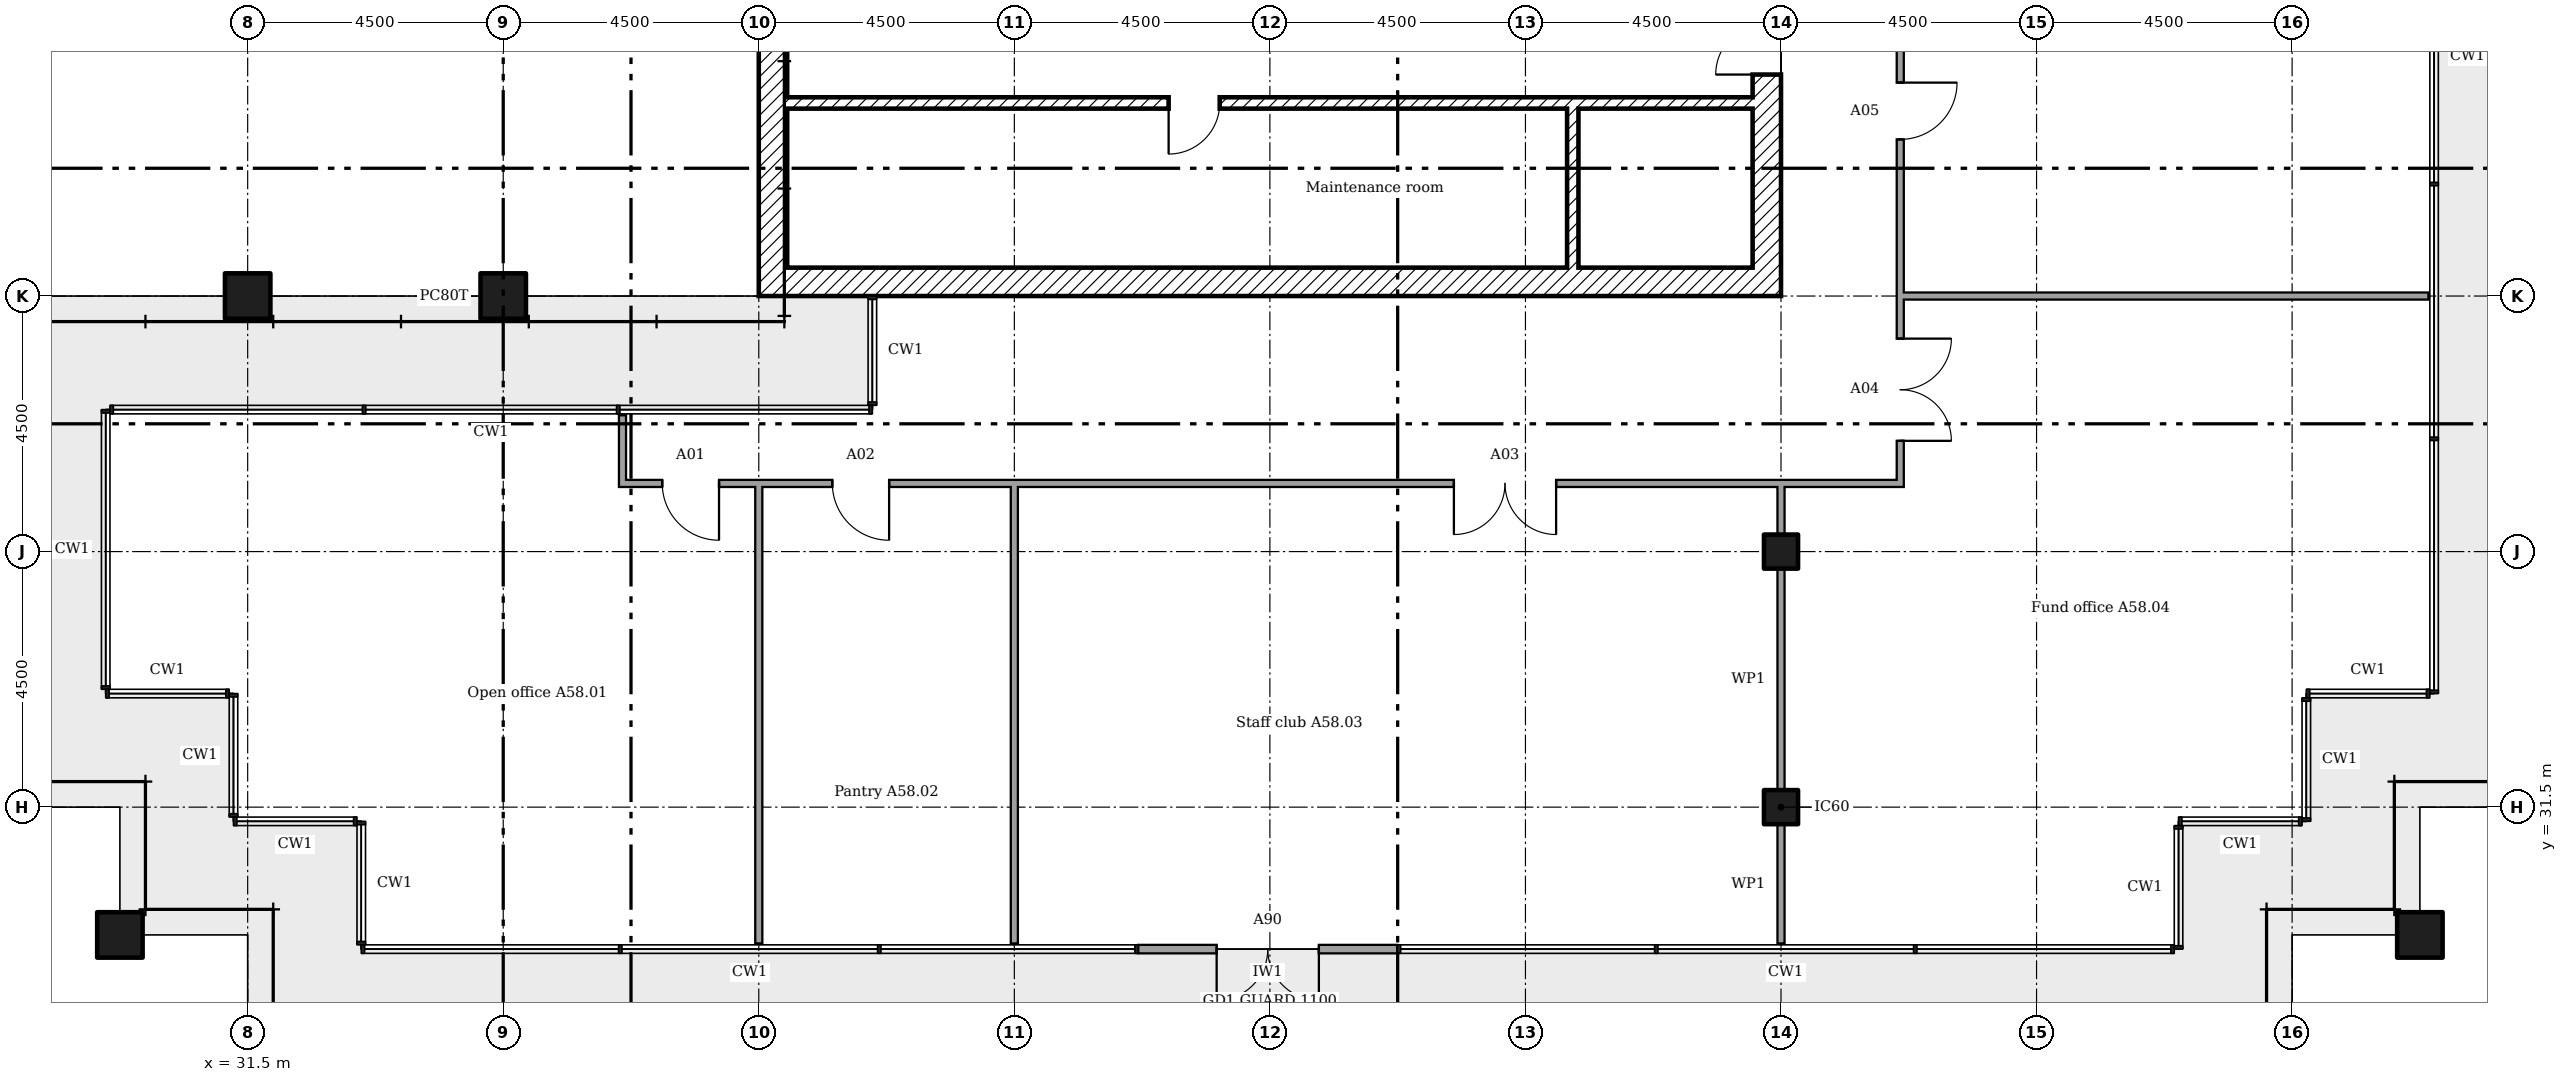
"""IFC4 building model, lengths in metres.
Left out: names, types, materials, properties, quantities, classifications, styles, units other than length and angle.
Written with IfcOpenShell. Run it as: python <this file> out.ifc"""

import sys

from ifc_helpers import new_model, si_unit, direction, frame, frame_2d, origin, origin_2d, place, context, subcontext, project, spatial, rectangle, extrude, element, fill, save


model = new_model("IFC4")
c1 = context("Model", 3, precision=1e-05, world=origin(), true_north=direction((0.0, 1.0)))
c2 = subcontext(c1, "Body", "Model", "MODEL_VIEW")
j1 = project(units=[si_unit("LENGTHUNIT", "METRE"), si_unit("PLANEANGLEUNIT", "RADIAN")], contexts=[c1])
p1 = place(None, origin())
s1 = spatial("IfcSite", under=j1, at=p1, CompositionType="ELEMENT")
p2 = place(p1, origin())
s2 = spatial("IfcBuilding", under=s1, at=p2, CompositionType="ELEMENT")
p3 = place(p2, frame((0.0, 0.0, 228.0)))
s3 = spatial("IfcBuildingStorey", under=s2, at=p3, CompositionType="ELEMENT", Elevation=228.0)
for number, where in (
    (1, (69.75, 29.25, 0.0)),
    (2, (36.0, 40.5, 0.0)),
    (3, (31.5, 40.5, 0.0)),
    (4, (29.25, 29.25, 0.0)),
):
    element("IfcColumn", number, at=place(p3, frame(where)), inside=s3, PredefinedType="COLUMN", context=c2, shape_type="SweptSolid", body=[
        extrude(rectangle(XDim=0.8, YDim=0.8, at=origin_2d()), origin(), (0.0, 0.0, 1.0), 3.6),
    ])
for number, where in (
    (5, (58.5, 31.5, 0.0)),
    (6, (58.5, 36.0, 0.0)),
):
    element("IfcColumn", number, at=place(p3, frame(where)), inside=s3, PredefinedType="COLUMN", context=c2, shape_type="SweptSolid", body=[
        extrude(rectangle(XDim=0.6, YDim=0.6, at=origin_2d()), origin(), (0.0, 0.0, 1.0), 3.6),
    ])
p4 = place(p3, frame((47.182, 29.0, 0.0)))
e7 = element("IfcWall", 7, at=p4, inside=s3, PredefinedType="SOLIDWALL", context=c2, shape_type="SweptSolid", body=[
    extrude(rectangle(XDim=4.561, YDim=0.15, at=frame_2d((2.28, 0.0))), origin(), (0.0, 0.0, 1.0), 3.45),
])
p5 = place(p4, frame((1.38, 0.0, 0.0)))
e8 = element("IfcOpeningElement", 8, at=p5, cuts=e7, PredefinedType="OPENING", context=c2, shape_type="SweptSolid", body=[
    extrude(rectangle(XDim=1.8, YDim=2.4, at=frame_2d((0.9, 1.2))), frame((0.0, 0.085, 0.0), z_axis=(0.0, -1.0, 0.0), x_axis=(1.0, 0.0, 0.0)), (0.0, 0.0, 1.0), 0.17),
])
p6 = place(p3, frame((58.25, 40.5, 0.0), z_axis=(0.0, 0.0, 1.0), x_axis=(0.0, 1.0, 0.0)))
e9 = element("IfcWall", 9, at=p6, inside=s3, PredefinedType="SHEAR", context=c2, shape_type="SweptSolid", body=[
    extrude(rectangle(XDim=18.0, YDim=0.5, at=frame_2d((9.0, 0.0))), origin(), (0.0, 0.0, 1.0), 3.35),
])
p7 = place(p6, frame((13.15, 0.0, 0.0)))
e10 = element("IfcOpeningElement", 10, at=p7, cuts=e9, PredefinedType="OPENING", context=c2, shape_type="SweptSolid", body=[
    extrude(rectangle(XDim=1.2, YDim=2.1, at=frame_2d((0.6, 1.05))), frame((0.0, 0.26, 0.0), z_axis=(0.0, -1.0, 0.0), x_axis=(1.0, 0.0, 0.0)), (0.0, 0.0, 1.0), 0.52),
])
p8 = place(p6, frame((3.9, 0.0, 0.0)))
e11 = element("IfcOpeningElement", 11, at=p8, cuts=e9, PredefinedType="OPENING", context=c2, shape_type="SweptSolid", body=[
    extrude(rectangle(XDim=1.8, YDim=2.1, at=frame_2d((0.9, 1.05))), frame((0.0, 0.26, 0.0), z_axis=(0.0, -1.0, 0.0), x_axis=(1.0, 0.0, 0.0)), (0.0, 0.0, 1.0), 0.52),
])
p9 = place(p6, frame((11.525, 0.0, 0.0)))
e12 = element("IfcOpeningElement", 12, at=p9, cuts=e9, PredefinedType="OPENING", context=c2, shape_type="SweptSolid", body=[
    extrude(rectangle(XDim=1.0, YDim=2.1, at=frame_2d((0.5, 1.05))), frame((0.0, 0.26, 0.0), z_axis=(0.0, -1.0, 0.0), x_axis=(1.0, 0.0, 0.0)), (0.0, 0.0, 1.0), 0.52),
])
p10 = place(p3, frame((40.5, 40.75, 0.0)))
e13 = element("IfcWall", 13, at=p10, inside=s3, PredefinedType="SHEAR", context=c2, shape_type="SweptSolid", body=[
    extrude(rectangle(XDim=17.5, YDim=0.5, at=frame_2d((8.75, 0.0))), origin(), (0.0, 0.0, 1.0), 3.35),
])
p11 = place(p3, frame((40.75, 41.0, 0.0), z_axis=(0.0, 0.0, 1.0), x_axis=(0.0, 1.0, 0.0)))
e14 = element("IfcWall", 14, at=p11, inside=s3, PredefinedType="SHEAR", context=c2, shape_type="SweptSolid", body=[
    extrude(rectangle(XDim=17.0, YDim=0.5, at=frame_2d((8.5, 0.0))), origin(), (0.0, 0.0, 1.0), 3.35),
])
p12 = place(p3, frame((54.833, 41.0, 0.0), z_axis=(0.0, 0.0, 1.0), x_axis=(0.0, 1.0, 0.0)))
e15 = element("IfcWall", 15, at=p12, inside=s3, PredefinedType="SHEAR", context=c2, shape_type="SweptSolid", body=[
    extrude(rectangle(XDim=2.8, YDim=0.2, at=frame_2d((1.4, 0.0))), origin(), (0.0, 0.0, 1.0), 3.35),
])
p13 = place(p3, frame((41.0, 43.9, 0.0)))
e16 = element("IfcWall", 16, at=p13, inside=s3, PredefinedType="SHEAR", context=c2, shape_type="SweptSolid", body=[
    extrude(rectangle(XDim=17.0, YDim=0.2, at=frame_2d((8.5, 0.0))), origin(), (0.0, 0.0, 1.0), 3.35),
])
p14 = place(p13, frame((6.717, 0.0, 0.0)))
e17 = element("IfcOpeningElement", 17, at=p14, cuts=e16, PredefinedType="OPENING", context=c2, shape_type="SweptSolid", body=[
    extrude(rectangle(XDim=0.9, YDim=2.1, at=frame_2d((0.45, 1.05))), frame((0.0, 0.11, 0.0), z_axis=(0.0, -1.0, 0.0), x_axis=(1.0, 0.0, 0.0)), (0.0, 0.0, 1.0), 0.22),
])
p15 = place(p3, frame((38.038, 37.2, 0.0)))
e18 = element("IfcWall", 18, at=p15, inside=s3, PredefinedType="PARTITIONING", context=c2, shape_type="SweptSolid", body=[
    extrude(rectangle(XDim=22.625, YDim=0.125, at=frame_2d((11.312, 0.0))), origin(), (0.0, 0.0, 1.0), 3.45),
])
p16 = place(p15, frame((0.762, 0.0, 0.0)))
e19 = element("IfcOpeningElement", 19, at=p16, cuts=e18, PredefinedType="OPENING", context=c2, shape_type="SweptSolid", body=[
    extrude(rectangle(XDim=1.0, YDim=2.1, at=frame_2d((0.5, 1.05))), frame((0.0, 0.073, 0.0), z_axis=(0.0, -1.0, 0.0), x_axis=(1.0, 0.0, 0.0)), (0.0, 0.0, 1.0), 0.145),
])
p17 = place(p15, frame((3.758, 0.0, 0.0)))
e20 = element("IfcOpeningElement", 20, at=p17, cuts=e18, PredefinedType="OPENING", context=c2, shape_type="SweptSolid", body=[
    extrude(rectangle(XDim=1.0, YDim=2.1, at=frame_2d((0.5, 1.05))), frame((0.0, 0.073, 0.0), z_axis=(0.0, -1.0, 0.0), x_axis=(1.0, 0.0, 0.0)), (0.0, 0.0, 1.0), 0.145),
])
p18 = place(p15, frame((14.702, 0.0, 0.0)))
e21 = element("IfcOpeningElement", 21, at=p18, cuts=e18, PredefinedType="OPENING", context=c2, shape_type="SweptSolid", body=[
    extrude(rectangle(XDim=1.8, YDim=2.1, at=frame_2d((0.9, 1.05))), frame((0.0, 0.073, 0.0), z_axis=(0.0, -1.0, 0.0), x_axis=(1.0, 0.0, 0.0)), (0.0, 0.0, 1.0), 0.145),
])
p19 = place(p3, frame((60.6, 40.5, 0.0)))
e22 = element("IfcWall", 22, at=p19, inside=s3, PredefinedType="PARTITIONING", context=c2, shape_type="SweptSolid", body=[
    extrude(rectangle(XDim=9.3, YDim=0.125, at=frame_2d((4.65, 0.0))), origin(), (0.0, 0.0, 1.0), 2.772),
])
p20 = place(p3, frame((38.1, 37.262, 0.0), z_axis=(0.0, 0.0, 1.0), x_axis=(0.0, 1.0, 0.0)))
e23 = element("IfcWall", 23, at=p20, inside=s3, PredefinedType="PARTITIONING", context=c2, shape_type="SweptSolid", body=[
    extrude(rectangle(XDim=1.137, YDim=0.125, at=frame_2d((0.569, 0.0))), origin(), (0.0, 0.0, 1.0), 3.45),
])
for number, where, z_axis, x_axis in (
    (24, (40.5, 29.1, 0.0), (0.0, 0.0, 1.0), (0.0, 1.0, 0.0)),
    (25, (45.0, 29.1, 0.0), (0.0, 0.0, 1.0), (0.0, 1.0, 0.0)),
):
    element("IfcWall", number, at=place(p3, frame(where, z_axis=z_axis, x_axis=x_axis)), inside=s3, PredefinedType="PARTITIONING", context=c2, shape_type="SweptSolid", body=[
        extrude(rectangle(XDim=8.1, YDim=0.125, at=frame_2d((4.05, 0.0))), origin(), (0.0, 0.0, 1.0), 2.772),
    ])
p21 = place(p3, frame((58.5, 29.1, 0.0), z_axis=(0.0, 0.0, 1.0), x_axis=(0.0, 1.0, 0.0)))
e26 = element("IfcWall", 26, at=p21, inside=s3, PredefinedType="PARTITIONING", context=c2, shape_type="SweptSolid", body=[
    extrude(rectangle(XDim=2.1, YDim=0.125, at=frame_2d((1.05, 0.0))), origin(), (0.0, 0.0, 1.0), 2.676),
])
p22 = place(p3, frame((58.5, 31.8, 0.0), z_axis=(0.0, 0.0, 1.0), x_axis=(0.0, 1.0, 0.0)))
e27 = element("IfcWall", 27, at=p22, inside=s3, PredefinedType="PARTITIONING", context=c2, shape_type="SweptSolid", body=[
    extrude(rectangle(XDim=3.9, YDim=0.125, at=frame_2d((1.95, 0.0))), origin(), (0.0, 0.0, 1.0), 2.676),
])
p23 = place(p3, frame((58.5, 36.3, 0.0), z_axis=(0.0, 0.0, 1.0), x_axis=(0.0, 1.0, 0.0)))
e28 = element("IfcWall", 28, at=p23, inside=s3, PredefinedType="PARTITIONING", context=c2, shape_type="SweptSolid", body=[
    extrude(rectangle(XDim=0.9, YDim=0.125, at=frame_2d((0.45, 0.0))), origin(), (0.0, 0.0, 1.0), 2.676),
])
p24 = place(p3, frame((60.6, 37.262, 0.0), z_axis=(0.0, 0.0, 1.0), x_axis=(0.0, 1.0, 0.0)))
e29 = element("IfcWall", 29, at=p24, inside=s3, PredefinedType="PARTITIONING", context=c2, shape_type="SweptSolid", body=[
    extrude(rectangle(XDim=24.175, YDim=0.125, at=frame_2d((12.087, 0.0))), origin(), (0.0, 0.0, 1.0), 3.45),
])
p25 = place(p24, frame((0.688, 0.0, 0.0)))
e30 = element("IfcOpeningElement", 30, at=p25, cuts=e29, PredefinedType="OPENING", context=c2, shape_type="SweptSolid", body=[
    extrude(rectangle(XDim=1.8, YDim=2.1, at=frame_2d((0.9, 1.05))), frame((0.0, 0.073, 0.0), z_axis=(0.0, -1.0, 0.0), x_axis=(1.0, 0.0, 0.0)), (0.0, 0.0, 1.0), 0.145),
])
p26 = place(p24, frame((5.996, 0.0, 0.0)))
e31 = element("IfcOpeningElement", 31, at=p26, cuts=e29, PredefinedType="OPENING", context=c2, shape_type="SweptSolid", body=[
    extrude(rectangle(XDim=1.0, YDim=2.1, at=frame_2d((0.5, 1.05))), frame((0.0, 0.073, 0.0), z_axis=(0.0, -1.0, 0.0), x_axis=(1.0, 0.0, 0.0)), (0.0, 0.0, 1.0), 0.145),
])
p27 = place(p24, frame((17.479, 0.0, 0.0)))
e32 = element("IfcOpeningElement", 32, at=p27, cuts=e29, PredefinedType="OPENING", context=c2, shape_type="SweptSolid", body=[
    extrude(rectangle(XDim=1.0, YDim=2.1, at=frame_2d((0.5, 1.05))), frame((0.0, 0.073, 0.0), z_axis=(0.0, -1.0, 0.0), x_axis=(1.0, 0.0, 0.0)), (0.0, 0.0, 1.0), 0.145),
])
p28 = place(p24, frame((21.837, 0.0, 0.0)))
e33 = element("IfcOpeningElement", 33, at=p28, cuts=e29, PredefinedType="OPENING", context=c2, shape_type="SweptSolid", body=[
    extrude(rectangle(XDim=1.8, YDim=2.1, at=frame_2d((0.9, 1.05))), frame((0.0, 0.073, 0.0), z_axis=(0.0, -1.0, 0.0), x_axis=(1.0, 0.0, 0.0)), (0.0, 0.0, 1.0), 0.145),
])
p29 = place(p5, frame((1.8, 0.0, 0.0), x_axis=(-1.0, 0.0, 0.0)))
e34 = element("IfcDoor", 34, at=p29, inside=s3, OperationType="DOUBLE_DOOR_DOUBLE_SWING", PredefinedType="NOTDEFINED", context=c2, shape_type="SweptSolid", body=[
    extrude(rectangle(XDim=1.8, YDim=2.4, at=frame_2d((0.9, 1.2))), frame((0.0, 0.025, 0.0), z_axis=(0.0, -1.0, 0.0), x_axis=(1.0, 0.0, 0.0)), (0.0, 0.0, 1.0), 0.05),
])
fill(e8, e34)
p30 = place(p8, origin())
e35 = element("IfcDoor", 35, at=p30, inside=s3, OperationType="DOUBLE_DOOR_SINGLE_SWING", PredefinedType="DOOR", context=c2, shape_type="SweptSolid", body=[
    extrude(rectangle(XDim=1.8, YDim=2.1, at=frame_2d((0.9, 1.05))), frame((0.0, 0.025, 0.0), z_axis=(0.0, -1.0, 0.0), x_axis=(1.0, 0.0, 0.0)), (0.0, 0.0, 1.0), 0.05),
])
fill(e11, e35)
p31 = place(p14, frame((0.9, 0.0, 0.0), x_axis=(-1.0, 0.0, 0.0)))
e36 = element("IfcDoor", 36, at=p31, inside=s3, OperationType="SINGLE_SWING_LEFT", PredefinedType="DOOR", context=c2, shape_type="SweptSolid", body=[
    extrude(rectangle(XDim=0.9, YDim=2.1, at=frame_2d((0.45, 1.05))), frame((0.0, 0.025, 0.0), z_axis=(0.0, -1.0, 0.0), x_axis=(1.0, 0.0, 0.0)), (0.0, 0.0, 1.0), 0.05),
])
fill(e17, e36)
p32 = place(p16, frame((1.0, 0.0, 0.0), x_axis=(-1.0, 0.0, 0.0)))
e37 = element("IfcDoor", 37, at=p32, inside=s3, OperationType="SINGLE_SWING_RIGHT", PredefinedType="DOOR", context=c2, shape_type="SweptSolid", body=[
    extrude(rectangle(XDim=1.0, YDim=2.1, at=frame_2d((0.5, 1.05))), frame((0.0, 0.025, 0.0), z_axis=(0.0, -1.0, 0.0), x_axis=(1.0, 0.0, 0.0)), (0.0, 0.0, 1.0), 0.05),
])
fill(e19, e37)
p33 = place(p17, frame((1.0, 0.0, 0.0), x_axis=(-1.0, 0.0, 0.0)))
e38 = element("IfcDoor", 38, at=p33, inside=s3, OperationType="SINGLE_SWING_RIGHT", PredefinedType="DOOR", context=c2, shape_type="SweptSolid", body=[
    extrude(rectangle(XDim=1.0, YDim=2.1, at=frame_2d((0.5, 1.05))), frame((0.0, 0.025, 0.0), z_axis=(0.0, -1.0, 0.0), x_axis=(1.0, 0.0, 0.0)), (0.0, 0.0, 1.0), 0.05),
])
fill(e20, e38)
p34 = place(p18, frame((1.8, 0.0, 0.0), x_axis=(-1.0, 0.0, 0.0)))
e39 = element("IfcDoor", 39, at=p34, inside=s3, OperationType="DOUBLE_DOOR_SINGLE_SWING", PredefinedType="DOOR", context=c2, shape_type="SweptSolid", body=[
    extrude(rectangle(XDim=1.8, YDim=2.1, at=frame_2d((0.9, 1.05))), frame((0.0, 0.025, 0.0), z_axis=(0.0, -1.0, 0.0), x_axis=(1.0, 0.0, 0.0)), (0.0, 0.0, 1.0), 0.05),
])
fill(e21, e39)
p35 = place(p25, frame((1.8, 0.0, 0.0), x_axis=(-1.0, 0.0, 0.0)))
e40 = element("IfcDoor", 40, at=p35, inside=s3, OperationType="DOUBLE_DOOR_SINGLE_SWING", PredefinedType="DOOR", context=c2, shape_type="SweptSolid", body=[
    extrude(rectangle(XDim=1.8, YDim=2.1, at=frame_2d((0.9, 1.05))), frame((0.0, 0.025, 0.0), z_axis=(0.0, -1.0, 0.0), x_axis=(1.0, 0.0, 0.0)), (0.0, 0.0, 1.0), 0.05),
])
fill(e30, e40)
p36 = place(p26, frame((1.0, 0.0, 0.0), x_axis=(-1.0, 0.0, 0.0)))
e41 = element("IfcDoor", 41, at=p36, inside=s3, OperationType="SINGLE_SWING_RIGHT", PredefinedType="DOOR", context=c2, shape_type="SweptSolid", body=[
    extrude(rectangle(XDim=1.0, YDim=2.1, at=frame_2d((0.5, 1.05))), frame((0.0, 0.025, 0.0), z_axis=(0.0, -1.0, 0.0), x_axis=(1.0, 0.0, 0.0)), (0.0, 0.0, 1.0), 0.05),
])
fill(e31, e41)
save(model, sys.argv[1])
